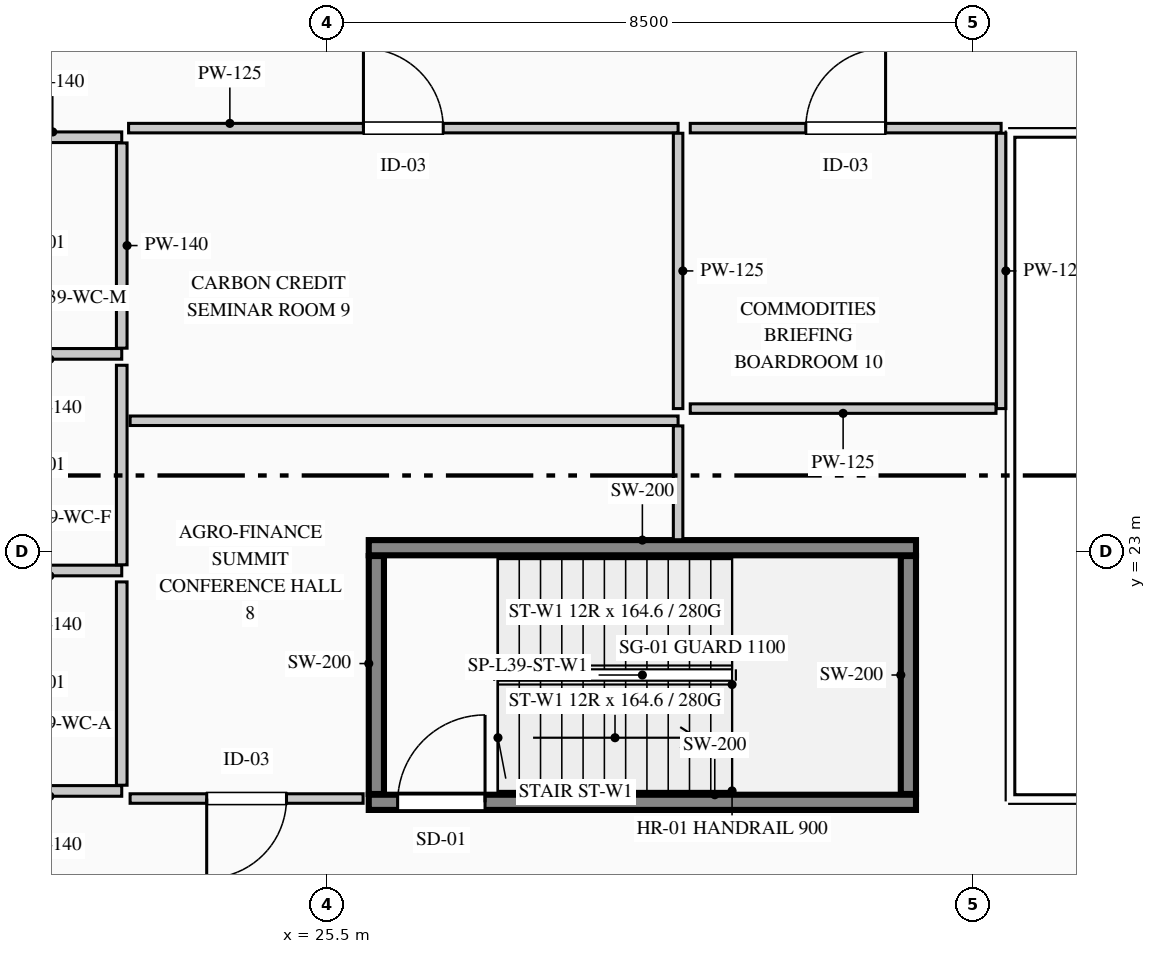
"""IFC4 building model, lengths in metres.
Left out: names, types, materials, properties, quantities, classifications, styles, units other than length and angle.
Written with IfcOpenShell. Run it as: python <this file> out.ifc"""

import sys

from ifc_helpers import new_model, si_unit, direction, frame, frame_2d, origin, place, context, subcontext, project, spatial, rectangle, extrude, element, fill, save


model = new_model("IFC4")
c1 = context("Model", 3, precision=1e-05, world=origin(), true_north=direction((0.0, 1.0)))
c2 = subcontext(c1, "Body", "Model", "MODEL_VIEW")
j1 = project(units=[si_unit("LENGTHUNIT", "METRE"), si_unit("PLANEANGLEUNIT", "RADIAN")], contexts=[c1])
p1 = place(None, origin())
s1 = spatial("IfcSite", under=j1, at=p1, CompositionType="ELEMENT")
p2 = place(p1, origin())
s2 = spatial("IfcBuilding", under=s1, at=p2, CompositionType="ELEMENT")
p3 = place(p2, frame((0.0, 0.0, 166.7)))
s3 = spatial("IfcBuildingStorey", under=s2, at=p3, CompositionType="ELEMENT", Elevation=166.7)
p4 = place(p3, frame((26.05, 19.7, 0.0), z_axis=(0.0, 0.0, 1.0), x_axis=(1.0, 0.0, 0.0)))
e1 = element("IfcWall", 1, at=p4, inside=s3, PredefinedType="SHEAR", context=c2, shape_type="SweptSolid", body=[
    extrude(rectangle(XDim=7.2, YDim=0.2, at=frame_2d((3.6, 0.0))), origin(), (0.0, 0.0, 1.0), 3.95),
])
p5 = place(p4, frame((0.38, 0.0, 0.0)))
e2 = element("IfcOpeningElement", 2, at=p5, cuts=e1, PredefinedType="OPENING", context=c2, shape_type="SweptSolid", body=[
    extrude(rectangle(XDim=1.15, YDim=2.2, at=frame_2d((0.575, 1.1))), frame((0.0, 0.11, 0.0), z_axis=(0.0, -1.0, 0.0), x_axis=(1.0, 0.0, 0.0)), (0.0, 0.0, 1.0), 0.22),
])
p6 = place(p3, frame((26.05, 23.05, 0.0), z_axis=(0.0, 0.0, 1.0), x_axis=(1.0, 0.0, 0.0)))
e3 = element("IfcWall", 3, at=p6, inside=s3, PredefinedType="SHEAR", context=c2, shape_type="SweptSolid", body=[
    extrude(rectangle(XDim=7.2, YDim=0.2, at=frame_2d((3.6, 0.0))), origin(), (0.0, 0.0, 1.0), 3.95),
])
for number, where, z_axis, x_axis in (
    (4, (26.15, 19.81, 0.0), (0.0, 0.0, 1.0), (0.0, 1.0, 0.0)),
    (5, (33.15, 19.81, 0.0), (0.0, 0.0, 1.0), (0.0, 1.0, 0.0)),
):
    element("IfcWall", number, at=place(p3, frame(where, z_axis=z_axis, x_axis=x_axis)), inside=s3, PredefinedType="SHEAR", context=c2, shape_type="SweptSolid", body=[
        extrude(rectangle(XDim=3.13, YDim=0.2, at=frame_2d((1.565, 0.0))), origin(), (0.0, 0.0, 1.0), 3.95),
    ])
p7 = place(p3, frame((22.8, 25.6, 0.0), z_axis=(0.0, 0.0, 1.0), x_axis=(-1.0, 0.0, 0.0)))
e6 = element("IfcWall", 6, at=p7, inside=s3, PredefinedType="PARTITIONING", context=c2, shape_type="SweptSolid", body=[
    extrude(rectangle(XDim=1.89, YDim=0.14, at=frame_2d((0.945, 0.0))), origin(), (0.0, 0.0, 1.0), 3.69),
])
p8 = place(p3, frame((20.985, 28.45, 0.0), z_axis=(0.0, 0.0, 1.0), x_axis=(1.0, 0.0, 0.0)))
e7 = element("IfcWall", 7, at=p8, inside=s3, PredefinedType="PARTITIONING", context=c2, shape_type="SweptSolid", body=[
    extrude(rectangle(XDim=1.815, YDim=0.14, at=frame_2d((0.907, 0.0))), origin(), (0.0, 0.0, 1.0), 3.69),
])
p9 = place(p3, frame((22.8, 28.375, 0.0), z_axis=(0.0, 0.0, 1.0), x_axis=(0.0, -1.0, 0.0)))
e8 = element("IfcWall", 8, at=p9, inside=s3, PredefinedType="PARTITIONING", context=c2, shape_type="SweptSolid", body=[
    extrude(rectangle(XDim=2.7, YDim=0.14, at=frame_2d((1.35, 0.0))), origin(), (0.0, 0.0, 1.0), 3.375),
])
p10 = place(p3, frame((22.8, 22.75, 0.0), z_axis=(0.0, 0.0, 1.0), x_axis=(-1.0, 0.0, 0.0)))
e9 = element("IfcWall", 9, at=p10, inside=s3, PredefinedType="PARTITIONING", context=c2, shape_type="SweptSolid", body=[
    extrude(rectangle(XDim=1.89, YDim=0.14, at=frame_2d((0.945, 0.0))), origin(), (0.0, 0.0, 1.0), 3.69),
])
p11 = place(p3, frame((22.8, 25.45, 0.0), z_axis=(0.0, 0.0, 1.0), x_axis=(0.0, -1.0, 0.0)))
e10 = element("IfcWall", 10, at=p11, inside=s3, PredefinedType="PARTITIONING", context=c2, shape_type="SweptSolid", body=[
    extrude(rectangle(XDim=2.625, YDim=0.14, at=frame_2d((1.312, 0.0))), origin(), (0.0, 0.0, 1.0), 3.375),
])
p12 = place(p3, frame((22.8, 19.85, 0.0), z_axis=(0.0, 0.0, 1.0), x_axis=(-1.0, 0.0, 0.0)))
e11 = element("IfcWall", 11, at=p12, inside=s3, PredefinedType="PARTITIONING", context=c2, shape_type="SweptSolid", body=[
    extrude(rectangle(XDim=1.89, YDim=0.14, at=frame_2d((0.945, 0.0))), origin(), (0.0, 0.0, 1.0), 3.69),
])
p13 = place(p3, frame((22.8, 22.6, 0.0), z_axis=(0.0, 0.0, 1.0), x_axis=(0.0, -1.0, 0.0)))
e12 = element("IfcWall", 12, at=p13, inside=s3, PredefinedType="PARTITIONING", context=c2, shape_type="SweptSolid", body=[
    extrude(rectangle(XDim=2.675, YDim=0.14, at=frame_2d((1.337, 0.0))), origin(), (0.0, 0.0, 1.0), 3.375),
])
p14 = place(p3, frame((25.976, 19.75, 0.0), z_axis=(0.0, 0.0, 1.0), x_axis=(-1.0, 0.0, 0.0)))
e13 = element("IfcWall", 13, at=p14, inside=s3, PredefinedType="PARTITIONING", context=c2, shape_type="SweptSolid", body=[
    extrude(rectangle(XDim=3.066, YDim=0.125, at=frame_2d((1.533, 0.0))), origin(), (0.0, 0.0, 1.0), 3.69),
])
p15 = place(p14, frame((1.008, 0.0, 0.0)))
e14 = element("IfcOpeningElement", 14, at=p15, cuts=e13, PredefinedType="OPENING", context=c2, shape_type="SweptSolid", body=[
    extrude(rectangle(XDim=1.05, YDim=2.15, at=frame_2d((0.525, 1.075))), frame((0.0, 0.073, 0.0), z_axis=(0.0, -1.0, 0.0), x_axis=(1.0, 0.0, 0.0)), (0.0, 0.0, 1.0), 0.145),
])
p16 = place(p3, frame((22.91, 24.72, 0.0), z_axis=(0.0, 0.0, 1.0), x_axis=(1.0, 0.0, 0.0)))
e15 = element("IfcWall", 15, at=p16, inside=s3, PredefinedType="PARTITIONING", context=c2, shape_type="SweptSolid", body=[
    extrude(rectangle(XDim=7.21, YDim=0.125, at=frame_2d((3.605, 0.0))), origin(), (0.0, 0.0, 1.0), 3.375),
])
p17 = place(p3, frame((30.12, 24.653, 0.0), z_axis=(0.0, 0.0, 1.0), x_axis=(0.0, -1.0, 0.0)))
e16 = element("IfcWall", 16, at=p17, inside=s3, PredefinedType="PARTITIONING", context=c2, shape_type="SweptSolid", body=[
    extrude(rectangle(XDim=1.498, YDim=0.125, at=frame_2d((0.749, 0.0))), origin(), (0.0, 0.0, 1.0), 3.69),
])
p18 = place(p3, frame((22.89, 28.57, 0.0), z_axis=(0.0, 0.0, 1.0), x_axis=(1.0, 0.0, 0.0)))
e17 = element("IfcWall", 17, at=p18, inside=s3, PredefinedType="PARTITIONING", context=c2, shape_type="SweptSolid", body=[
    extrude(rectangle(XDim=7.23, YDim=0.125, at=frame_2d((3.615, 0.0))), origin(), (0.0, 0.0, 1.0), 3.375),
])
p19 = place(p18, frame((3.09, 0.0, 0.0)))
e18 = element("IfcOpeningElement", 18, at=p19, cuts=e17, PredefinedType="OPENING", context=c2, shape_type="SweptSolid", body=[
    extrude(rectangle(XDim=1.05, YDim=2.15, at=frame_2d((0.525, 1.075))), frame((0.0, 0.073, 0.0), z_axis=(0.0, -1.0, 0.0), x_axis=(1.0, 0.0, 0.0)), (0.0, 0.0, 1.0), 0.145),
])
p20 = place(p3, frame((30.12, 28.502, 0.0), z_axis=(0.0, 0.0, 1.0), x_axis=(0.0, -1.0, 0.0)))
e19 = element("IfcWall", 19, at=p20, inside=s3, PredefinedType="PARTITIONING", context=c2, shape_type="SweptSolid", body=[
    extrude(rectangle(XDim=3.623, YDim=0.125, at=frame_2d((1.811, 0.0))), origin(), (0.0, 0.0, 1.0), 3.69),
])
p21 = place(p3, frame((30.28, 28.57, 0.0), z_axis=(0.0, 0.0, 1.0), x_axis=(1.0, 0.0, 0.0)))
e20 = element("IfcWall", 20, at=p21, inside=s3, PredefinedType="PARTITIONING", context=c2, shape_type="SweptSolid", body=[
    extrude(rectangle(XDim=4.09, YDim=0.125, at=frame_2d((2.045, 0.0))), origin(), (0.0, 0.0, 1.0), 3.375),
])
p22 = place(p21, frame((1.52, 0.0, 0.0)))
e21 = element("IfcOpeningElement", 21, at=p22, cuts=e20, PredefinedType="OPENING", context=c2, shape_type="SweptSolid", body=[
    extrude(rectangle(XDim=1.05, YDim=2.15, at=frame_2d((0.525, 1.075))), frame((0.0, 0.073, 0.0), z_axis=(0.0, -1.0, 0.0), x_axis=(1.0, 0.0, 0.0)), (0.0, 0.0, 1.0), 0.145),
])
p23 = place(p3, frame((34.37, 28.502, 0.0), z_axis=(0.0, 0.0, 1.0), x_axis=(0.0, -1.0, 0.0)))
e22 = element("IfcWall", 22, at=p23, inside=s3, PredefinedType="PARTITIONING", context=c2, shape_type="SweptSolid", body=[
    extrude(rectangle(XDim=3.623, YDim=0.125, at=frame_2d((1.811, 0.0))), origin(), (0.0, 0.0, 1.0), 3.69),
])
p24 = place(p3, frame((34.302, 24.88, 0.0), z_axis=(0.0, 0.0, 1.0), x_axis=(-1.0, 0.0, 0.0)))
e23 = element("IfcWall", 23, at=p24, inside=s3, PredefinedType="PARTITIONING", context=c2, shape_type="SweptSolid", body=[
    extrude(rectangle(XDim=4.022, YDim=0.125, at=frame_2d((2.011, 0.0))), origin(), (0.0, 0.0, 1.0), 3.375),
])
p25 = place(p5, origin())
e24 = element("IfcDoor", 24, at=p25, inside=s3, OperationType="SINGLE_SWING_RIGHT", PredefinedType="DOOR", context=c2, shape_type="SweptSolid", body=[
    extrude(rectangle(XDim=1.15, YDim=2.2, at=frame_2d((0.575, 1.1))), frame((0.0, 0.025, 0.0), z_axis=(0.0, -1.0, 0.0), x_axis=(1.0, 0.0, 0.0)), (0.0, 0.0, 1.0), 0.05),
])
fill(e2, e24)
p26 = place(p15, origin())
e25 = element("IfcDoor", 25, at=p26, inside=s3, OperationType="SINGLE_SWING_RIGHT", PredefinedType="DOOR", context=c2, shape_type="SweptSolid", body=[
    extrude(rectangle(XDim=1.05, YDim=2.15, at=frame_2d((0.525, 1.075))), frame((0.0, 0.025, 0.0), z_axis=(0.0, -1.0, 0.0), x_axis=(1.0, 0.0, 0.0)), (0.0, 0.0, 1.0), 0.05),
])
fill(e14, e25)
p27 = place(p19, origin())
e26 = element("IfcDoor", 26, at=p27, inside=s3, OperationType="SINGLE_SWING_LEFT", PredefinedType="DOOR", context=c2, shape_type="SweptSolid", body=[
    extrude(rectangle(XDim=1.05, YDim=2.15, at=frame_2d((0.525, 1.075))), frame((0.0, 0.025, 0.0), z_axis=(0.0, -1.0, 0.0), x_axis=(1.0, 0.0, 0.0)), (0.0, 0.0, 1.0), 0.05),
])
fill(e18, e26)
p28 = place(p22, origin())
e27 = element("IfcDoor", 27, at=p28, inside=s3, OperationType="SINGLE_SWING_RIGHT", PredefinedType="DOOR", context=c2, shape_type="SweptSolid", body=[
    extrude(rectangle(XDim=1.05, YDim=2.15, at=frame_2d((0.525, 1.075))), frame((0.0, 0.025, 0.0), z_axis=(0.0, -1.0, 0.0), x_axis=(1.0, 0.0, 0.0)), (0.0, 0.0, 1.0), 0.05),
])
fill(e21, e27)
save(model, sys.argv[1])
